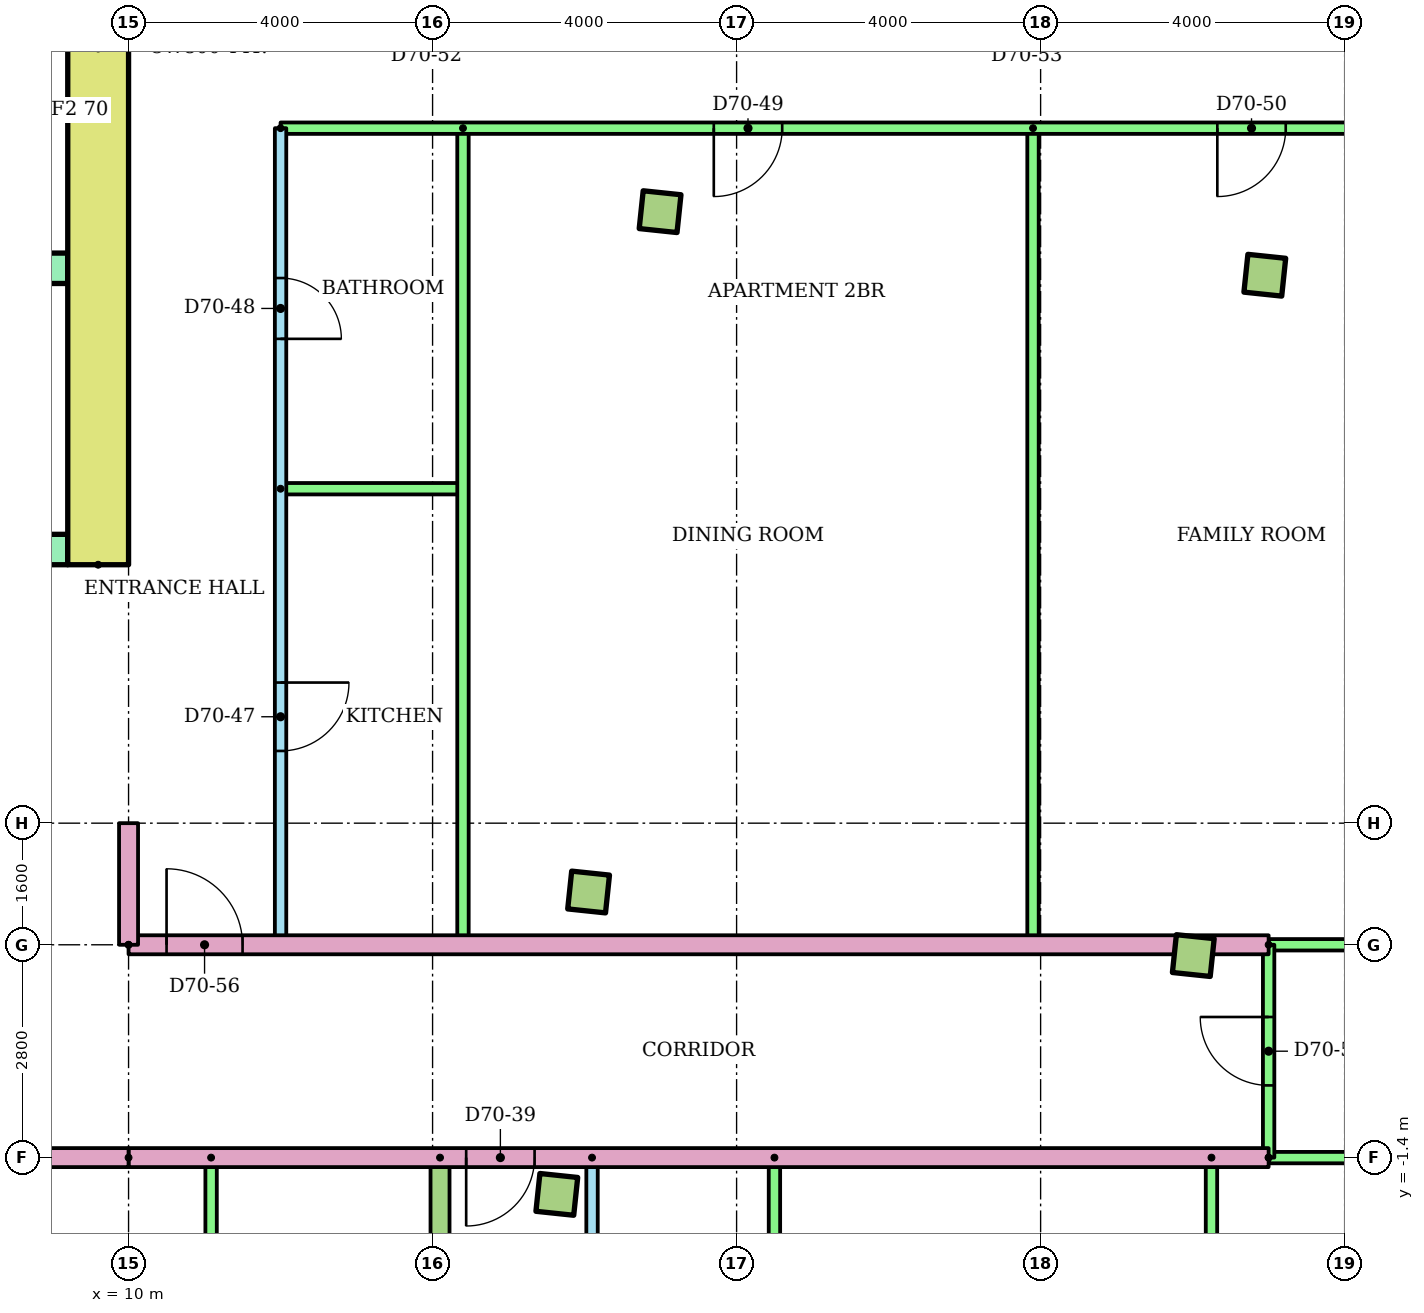
"""IFC4 building model, lengths in metres.
Left out: names, types, materials, properties, quantities, classifications, styles, units other than length and angle.
Written with IfcOpenShell. Run it as: python <this file> out.ifc"""

import sys

from ifc_helpers import new_model, si_unit, direction, frame, frame_2d, origin, origin_2d, place, context, subcontext, project, spatial, rectangle, extrude, element, fill, save


model = new_model("IFC4")
c1 = context("Model", 3, precision=1e-05, world=origin(), true_north=direction((0.0, 1.0)))
c2 = subcontext(c1, "Body", "Model", "MODEL_VIEW")
j1 = project(units=[si_unit("LENGTHUNIT", "METRE"), si_unit("PLANEANGLEUNIT", "RADIAN")], contexts=[c1])
p1 = place(None, origin())
s1 = spatial("IfcSite", under=j1, at=p1, CompositionType="ELEMENT")
p2 = place(p1, origin())
s2 = spatial("IfcBuilding", under=s1, at=p2, CompositionType="ELEMENT")
p3 = place(p2, frame((0.0, 0.0, 269.1)))
s3 = spatial("IfcBuildingStorey", under=s2, at=p3, CompositionType="ELEMENT", Elevation=269.1)
for number, where, z_axis, x_axis in (
    (1, (15.635, -1.884, 0.0), (0.0, 0.0, 1.0), (0.995, -0.105, 0.0)),
    (2, (16.053, 2.094, 0.0), (0.0, 0.0, 1.0), (0.995, -0.105, 0.0)),
    (3, (24.009, 1.258, 0.0), (0.0, 0.0, 1.0), (0.995, -0.105, 0.0)),
    (4, (16.993, 11.045, 0.0), (0.0, 0.0, 1.0), (0.995, -0.105, 0.0)),
    (5, (24.95, 10.209, 0.0), (0.0, 0.0, 1.0), (0.995, -0.105, 0.0)),
):
    element("IfcColumn", number, at=place(p3, frame(where, z_axis=z_axis, x_axis=x_axis)), inside=s3, PredefinedType="COLUMN", context=c2, shape_type="SweptSolid", body=[
        extrude(rectangle(XDim=0.5, YDim=0.5, at=origin_2d()), origin(), (0.0, 0.0, 1.0), 3.2),
    ])
p4 = place(p3, frame((9.6, 6.4, 0.0), z_axis=(0.0, 0.0, 1.0), x_axis=(0.0, 1.0, 0.0)))
e6 = element("IfcWall", 6, at=p4, inside=s3, PredefinedType="SHEAR", context=c2, shape_type="SweptSolid", body=[
    extrude(rectangle(XDim=13.6, YDim=0.8, at=frame_2d((6.8, 0.0))), origin(), (0.0, 0.0, 1.0), 2.92),
])
p5 = place(p3, frame((-9.2, 6.6, 0.0)))
e7 = element("IfcWall", 7, at=p5, inside=s3, PredefinedType="SHEAR", context=c2, shape_type="SweptSolid", body=[
    extrude(rectangle(XDim=18.4, YDim=0.4, at=frame_2d((9.2, 0.0))), origin(), (0.0, 0.0, 1.0), 2.92),
])
p6 = place(p5, frame((8.3, 0.0, 0.0)))
e8 = element("IfcOpeningElement", 8, at=p6, cuts=e7, PredefinedType="OPENING", context=c2, shape_type="SweptSolid", body=[
    extrude(rectangle(XDim=1.8, YDim=2.1, at=frame_2d((0.9, 1.05))), frame((0.0, 0.21, 0.0), z_axis=(0.0, -1.0, 0.0), x_axis=(1.0, 0.0, 0.0)), (0.0, 0.0, 1.0), 0.42),
])
p7 = place(p5, frame((3.8, 0.0, 0.0)))
e9 = element("IfcOpeningElement", 9, at=p7, cuts=e7, PredefinedType="OPENING", context=c2, shape_type="SweptSolid", body=[
    extrude(rectangle(XDim=1.8, YDim=2.1, at=frame_2d((0.9, 1.05))), frame((0.0, 0.21, 0.0), z_axis=(0.0, -1.0, 0.0), x_axis=(1.0, 0.0, 0.0)), (0.0, 0.0, 1.0), 0.42),
])
p8 = place(p5, frame((12.8, 0.0, 0.0)))
e10 = element("IfcOpeningElement", 10, at=p8, cuts=e7, PredefinedType="OPENING", context=c2, shape_type="SweptSolid", body=[
    extrude(rectangle(XDim=1.8, YDim=2.1, at=frame_2d((0.9, 1.05))), frame((0.0, 0.21, 0.0), z_axis=(0.0, -1.0, 0.0), x_axis=(1.0, 0.0, 0.0)), (0.0, 0.0, 1.0), 0.42),
])
p9 = place(p3, frame((1.2, 10.3, 0.0)))
e11 = element("IfcWall", 11, at=p9, inside=s3, PredefinedType="SHEAR", context=c2, shape_type="SweptSolid", body=[
    extrude(rectangle(XDim=8.0, YDim=0.4, at=frame_2d((4.0, 0.0))), origin(), (0.0, 0.0, 1.0), 2.92),
])
p10 = place(p9, frame((0.817, 0.0, 0.0)))
e12 = element("IfcOpeningElement", 12, at=p10, cuts=e11, PredefinedType="OPENING", context=c2, shape_type="SweptSolid", body=[
    extrude(rectangle(XDim=1.1, YDim=2.1, at=frame_2d((0.55, 1.05))), frame((0.0, 0.21, 0.0), z_axis=(0.0, -1.0, 0.0), x_axis=(1.0, 0.0, 0.0)), (0.0, 0.0, 1.0), 0.42),
])
p11 = place(p9, frame((3.55, 0.0, 0.0)))
e13 = element("IfcOpeningElement", 13, at=p11, cuts=e11, PredefinedType="OPENING", context=c2, shape_type="SweptSolid", body=[
    extrude(rectangle(XDim=1.1, YDim=2.1, at=frame_2d((0.55, 1.05))), frame((0.0, 0.21, 0.0), z_axis=(0.0, -1.0, 0.0), x_axis=(1.0, 0.0, 0.0)), (0.0, 0.0, 1.0), 0.42),
])
p12 = place(p9, frame((6.283, 0.0, 0.0)))
e14 = element("IfcOpeningElement", 14, at=p12, cuts=e11, PredefinedType="OPENING", context=c2, shape_type="SweptSolid", body=[
    extrude(rectangle(XDim=1.1, YDim=2.1, at=frame_2d((0.55, 1.05))), frame((0.0, 0.21, 0.0), z_axis=(0.0, -1.0, 0.0), x_axis=(1.0, 0.0, 0.0)), (0.0, 0.0, 1.0), 0.42),
])
p13 = place(p3, frame((11.086, -1.4, 0.0), z_axis=(0.0, 0.0, 1.0), x_axis=(0.0, -1.0, 0.0)))
e15 = element("IfcWall", 15, at=p13, inside=s3, PredefinedType="PARTITIONING", context=c2, shape_type="SweptSolid", body=[
    extrude(rectangle(XDim=7.484, YDim=0.15, at=frame_2d((3.742, 0.0))), origin(), (0.0, 0.0, 1.0), 2.4),
])
p14 = place(p3, frame((16.098, -1.4, 0.0), z_axis=(0.0, 0.0, 1.0), x_axis=(0.0, -1.0, 0.0)))
e16 = element("IfcWall", 16, at=p14, inside=s3, PredefinedType="PARTITIONING", context=c2, shape_type="SweptSolid", body=[
    extrude(rectangle(XDim=8.982, YDim=0.15, at=frame_2d((4.491, 0.0))), origin(), (0.0, 0.0, 1.0), 2.4),
])
p15 = place(p14, frame((2.05, 0.0, 0.0)))
e17 = element("IfcOpeningElement", 17, at=p15, cuts=e16, PredefinedType="OPENING", context=c2, shape_type="SweptSolid", body=[
    extrude(rectangle(XDim=0.9, YDim=2.1, at=frame_2d((0.45, 1.05))), frame((0.0, 0.085, 0.0), z_axis=(0.0, -1.0, 0.0), x_axis=(1.0, 0.0, 0.0)), (0.0, 0.0, 1.0), 0.17),
])
p16 = place(p14, frame((6.591, 0.0, 0.0)))
e18 = element("IfcOpeningElement", 18, at=p16, cuts=e16, PredefinedType="OPENING", context=c2, shape_type="SweptSolid", body=[
    extrude(rectangle(XDim=0.8, YDim=2.1, at=frame_2d((0.4, 1.05))), frame((0.0, 0.085, 0.0), z_axis=(0.0, -1.0, 0.0), x_axis=(1.0, 0.0, 0.0)), (0.0, 0.0, 1.0), 0.17),
])
for number, where, z_axis, x_axis in (
    (19, (18.498, -1.4, 0.0), (0.0, 0.0, 1.0), (0.0, -1.0, 0.0)),
    (20, (24.248, -1.4, 0.0), (0.0, 0.0, 1.0), (0.0, -1.0, 0.0)),
):
    element("IfcWall", number, at=place(p3, frame(where, z_axis=z_axis, x_axis=x_axis)), inside=s3, PredefinedType="PARTITIONING", context=c2, shape_type="SweptSolid", body=[
        extrude(rectangle(XDim=8.982, YDim=0.15, at=frame_2d((4.491, 0.0))), origin(), (0.0, 0.0, 1.0), 2.4),
    ])
p17 = place(p3, frame((14.098, -1.4, 0.0), z_axis=(0.0, 0.0, 1.0), x_axis=(0.0, -1.0, 0.0)))
e21 = element("IfcWall", 21, at=p17, inside=s3, PredefinedType="PARTITIONING", context=c2, shape_type="SweptSolid", body=[
    extrude(rectangle(XDim=15.013, YDim=0.25, at=frame_2d((7.506, 0.0))), origin(), (0.0, 0.0, 1.0), 2.4),
])
p18 = place(p3, frame((25.0, -1.4, 0.0), z_axis=(0.0, 0.0, 1.0), x_axis=(-1.0, 0.0, 0.0)))
e22 = element("IfcWall", 22, at=p18, inside=s3, PredefinedType="PARTITIONING", context=c2, shape_type="SweptSolid", body=[
    extrude(rectangle(XDim=15.0, YDim=0.25, at=frame_2d((7.5, 0.0))), origin(), (0.0, 0.0, 1.0), 2.4),
])
p19 = place(p18, frame((9.658, 0.0, 0.0)))
e23 = element("IfcOpeningElement", 23, at=p19, cuts=e22, PredefinedType="OPENING", context=c2, shape_type="SweptSolid", body=[
    extrude(rectangle(XDim=0.9, YDim=2.1, at=frame_2d((0.45, 1.05))), frame((0.0, 0.135, 0.0), z_axis=(0.0, -1.0, 0.0), x_axis=(1.0, 0.0, 0.0)), (0.0, 0.0, 1.0), 0.27),
])
p20 = place(p3, frame((30.798, -1.4, 0.0), z_axis=(0.0, 0.0, 1.0), x_axis=(-1.0, 0.0, 0.0)))
e24 = element("IfcWall", 24, at=p20, inside=s3, PredefinedType="PARTITIONING", context=c2, shape_type="SweptSolid", body=[
    extrude(rectangle(XDim=5.798, YDim=0.15, at=frame_2d((2.899, 0.0))), origin(), (0.0, 0.0, 1.0), 2.4),
])
p21 = place(p3, frame((12.0, 12.143, 0.0), z_axis=(0.0, 0.0, 1.0), x_axis=(0.0, -1.0, 0.0)))
e25 = element("IfcWall", 25, at=p21, inside=s3, PredefinedType="PARTITIONING", context=c2, shape_type="SweptSolid", body=[
    extrude(rectangle(XDim=10.743, YDim=0.15, at=frame_2d((5.372, 0.0))), origin(), (0.0, 0.0, 1.0), 2.4),
])
p22 = place(p21, frame((7.293, 0.0, 0.0)))
e26 = element("IfcOpeningElement", 26, at=p22, cuts=e25, PredefinedType="OPENING", context=c2, shape_type="SweptSolid", body=[
    extrude(rectangle(XDim=0.9, YDim=2.1, at=frame_2d((0.45, 1.05))), frame((0.0, 0.085, 0.0), z_axis=(0.0, -1.0, 0.0), x_axis=(1.0, 0.0, 0.0)), (0.0, 0.0, 1.0), 0.17),
])
p23 = place(p21, frame((1.972, 0.0, 0.0)))
e27 = element("IfcOpeningElement", 27, at=p23, cuts=e25, PredefinedType="OPENING", context=c2, shape_type="SweptSolid", body=[
    extrude(rectangle(XDim=0.8, YDim=2.1, at=frame_2d((0.4, 1.05))), frame((0.0, 0.085, 0.0), z_axis=(0.0, -1.0, 0.0), x_axis=(1.0, 0.0, 0.0)), (0.0, 0.0, 1.0), 0.17),
])
p24 = place(p3, frame((12.0, 7.4, 0.0)))
e28 = element("IfcWall", 28, at=p24, inside=s3, PredefinedType="PARTITIONING", context=c2, shape_type="SweptSolid", body=[
    extrude(rectangle(XDim=2.4, YDim=0.15, at=frame_2d((1.2, 0.0))), origin(), (0.0, 0.0, 1.0), 2.4),
])
for number, where, z_axis, x_axis in (
    (29, (14.4, 12.143, 0.0), (0.0, 0.0, 1.0), (0.0, -1.0, 0.0)),
    (30, (21.9, 12.143, 0.0), (0.0, 0.0, 1.0), (0.0, -1.0, 0.0)),
):
    element("IfcWall", number, at=place(p3, frame(where, z_axis=z_axis, x_axis=x_axis)), inside=s3, PredefinedType="PARTITIONING", context=c2, shape_type="SweptSolid", body=[
        extrude(rectangle(XDim=10.743, YDim=0.15, at=frame_2d((5.372, 0.0))), origin(), (0.0, 0.0, 1.0), 2.4),
    ])
p25 = place(p3, frame((32.213, 12.143, 0.0), z_axis=(0.0, 0.0, 1.0), x_axis=(-1.0, 0.0, 0.0)))
e31 = element("IfcWall", 31, at=p25, inside=s3, PredefinedType="PARTITIONING", context=c2, shape_type="SweptSolid", body=[
    extrude(rectangle(XDim=20.213, YDim=0.15, at=frame_2d((10.106, 0.0))), origin(), (0.0, 0.0, 1.0), 2.4),
])
p26 = place(p25, frame((13.613, 0.0, 0.0)))
e32 = element("IfcOpeningElement", 32, at=p26, cuts=e31, PredefinedType="OPENING", context=c2, shape_type="SweptSolid", body=[
    extrude(rectangle(XDim=0.9, YDim=2.1, at=frame_2d((0.45, 1.05))), frame((0.0, 0.085, 0.0), z_axis=(0.0, -1.0, 0.0), x_axis=(1.0, 0.0, 0.0)), (0.0, 0.0, 1.0), 0.17),
])
p27 = place(p25, frame((6.988, 0.0, 0.0)))
e33 = element("IfcOpeningElement", 33, at=p27, cuts=e31, PredefinedType="OPENING", context=c2, shape_type="SweptSolid", body=[
    extrude(rectangle(XDim=0.9, YDim=2.1, at=frame_2d((0.45, 1.05))), frame((0.0, 0.085, 0.0), z_axis=(0.0, -1.0, 0.0), x_axis=(1.0, 0.0, 0.0)), (0.0, 0.0, 1.0), 0.17),
])
p28 = place(p25, frame((1.909, 0.0, 0.0)))
e34 = element("IfcOpeningElement", 34, at=p28, cuts=e31, PredefinedType="OPENING", context=c2, shape_type="SweptSolid", body=[
    extrude(rectangle(XDim=0.9, YDim=2.1, at=frame_2d((0.45, 1.05))), frame((0.0, 0.085, 0.0), z_axis=(0.0, -1.0, 0.0), x_axis=(1.0, 0.0, 0.0)), (0.0, 0.0, 1.0), 0.17),
])
p29 = place(p3, frame((10.0, 1.4, 0.0)))
e35 = element("IfcWall", 35, at=p29, inside=s3, PredefinedType="PARTITIONING", context=c2, shape_type="SweptSolid", body=[
    extrude(rectangle(XDim=15.0, YDim=0.25, at=frame_2d((7.5, 0.0))), origin(), (0.0, 0.0, 1.0), 2.4),
])
p30 = place(p29, frame((0.5, 0.0, 0.0)))
e36 = element("IfcOpeningElement", 36, at=p30, cuts=e35, PredefinedType="OPENING", context=c2, shape_type="SweptSolid", body=[
    extrude(rectangle(XDim=1.0, YDim=2.1, at=frame_2d((0.5, 1.05))), frame((0.0, 0.135, 0.0), z_axis=(0.0, -1.0, 0.0), x_axis=(1.0, 0.0, 0.0)), (0.0, 0.0, 1.0), 0.27),
])
p31 = place(p3, frame((25.0, 1.4, 0.0)))
e37 = element("IfcWall", 37, at=p31, inside=s3, PredefinedType="PARTITIONING", context=c2, shape_type="SweptSolid", body=[
    extrude(rectangle(XDim=6.093, YDim=0.15, at=frame_2d((3.046, 0.0))), origin(), (0.0, 0.0, 1.0), 2.4),
])
p32 = place(p3, frame((25.0, -1.4, 0.0), z_axis=(0.0, 0.0, 1.0), x_axis=(0.0, 1.0, 0.0)))
e38 = element("IfcWall", 38, at=p32, inside=s3, PredefinedType="PARTITIONING", context=c2, shape_type="SweptSolid", body=[
    extrude(rectangle(XDim=2.8, YDim=0.15, at=frame_2d((1.4, 0.0))), origin(), (0.0, 0.0, 1.0), 2.4),
])
p33 = place(p32, frame((0.95, 0.0, 0.0)))
e39 = element("IfcOpeningElement", 39, at=p33, cuts=e38, PredefinedType="OPENING", context=c2, shape_type="SweptSolid", body=[
    extrude(rectangle(XDim=0.9, YDim=2.1, at=frame_2d((0.45, 1.05))), frame((0.0, 0.085, 0.0), z_axis=(0.0, -1.0, 0.0), x_axis=(1.0, 0.0, 0.0)), (0.0, 0.0, 1.0), 0.17),
])
p34 = place(p3, frame((10.0, -1.4, 0.0), z_axis=(0.0, 0.0, 1.0), x_axis=(-1.0, 0.0, 0.0)))
e40 = element("IfcWall", 40, at=p34, inside=s3, PredefinedType="PARTITIONING", context=c2, shape_type="SweptSolid", body=[
    extrude(rectangle(XDim=20.0, YDim=0.25, at=frame_2d((10.0, 0.0))), origin(), (0.0, 0.0, 1.0), 2.4),
])
p35 = place(p34, frame((12.314, 0.0, 0.0)))
e41 = element("IfcOpeningElement", 41, at=p35, cuts=e40, PredefinedType="OPENING", context=c2, shape_type="SweptSolid", body=[
    extrude(rectangle(XDim=1.0, YDim=2.1, at=frame_2d((0.5, 1.05))), frame((0.0, 0.135, 0.0), z_axis=(0.0, -1.0, 0.0), x_axis=(1.0, 0.0, 0.0)), (0.0, 0.0, 1.0), 0.27),
])
p36 = place(p34, frame((10.57, 0.0, 0.0)))
e42 = element("IfcOpeningElement", 42, at=p36, cuts=e40, PredefinedType="OPENING", context=c2, shape_type="SweptSolid", body=[
    extrude(rectangle(XDim=0.9, YDim=2.1, at=frame_2d((0.45, 1.05))), frame((0.0, 0.135, 0.0), z_axis=(0.0, -1.0, 0.0), x_axis=(1.0, 0.0, 0.0)), (0.0, 0.0, 1.0), 0.27),
])
p37 = place(p3, frame((10.0, 1.4, 0.0), z_axis=(0.0, 0.0, 1.0), x_axis=(0.0, 1.0, 0.0)))
e43 = element("IfcWall", 43, at=p37, inside=s3, PredefinedType="PARTITIONING", context=c2, shape_type="SweptSolid", body=[
    extrude(rectangle(XDim=1.6, YDim=0.25, at=frame_2d((0.8, 0.0))), origin(), (0.0, 0.0, 1.0), 2.4),
])
p38 = place(p19, origin())
e44 = element("IfcDoor", 44, at=p38, inside=s3, OperationType="SINGLE_SWING_RIGHT", PredefinedType="DOOR", context=c2, shape_type="SweptSolid", body=[
    extrude(rectangle(XDim=0.9, YDim=2.1, at=frame_2d((0.45, 1.05))), frame((0.0, 0.025, 0.0), z_axis=(0.0, -1.0, 0.0), x_axis=(1.0, 0.0, 0.0)), (0.0, 0.0, 1.0), 0.05),
])
fill(e23, e44)
p39 = place(p22, origin())
e45 = element("IfcDoor", 45, at=p39, inside=s3, OperationType="SINGLE_SWING_LEFT", PredefinedType="DOOR", context=c2, shape_type="SweptSolid", body=[
    extrude(rectangle(XDim=0.9, YDim=2.1, at=frame_2d((0.45, 1.05))), frame((0.0, 0.025, 0.0), z_axis=(0.0, -1.0, 0.0), x_axis=(1.0, 0.0, 0.0)), (0.0, 0.0, 1.0), 0.05),
])
fill(e26, e45)
p40 = place(p23, origin())
e46 = element("IfcDoor", 46, at=p40, inside=s3, OperationType="SINGLE_SWING_RIGHT", PredefinedType="DOOR", context=c2, shape_type="SweptSolid", body=[
    extrude(rectangle(XDim=0.8, YDim=2.1, at=frame_2d((0.4, 1.05))), frame((0.0, 0.025, 0.0), z_axis=(0.0, -1.0, 0.0), x_axis=(1.0, 0.0, 0.0)), (0.0, 0.0, 1.0), 0.05),
])
fill(e27, e46)
p41 = place(p26, origin())
e47 = element("IfcDoor", 47, at=p41, inside=s3, OperationType="SINGLE_SWING_RIGHT", PredefinedType="DOOR", context=c2, shape_type="SweptSolid", body=[
    extrude(rectangle(XDim=0.9, YDim=2.1, at=frame_2d((0.45, 1.05))), frame((0.0, 0.025, 0.0), z_axis=(0.0, -1.0, 0.0), x_axis=(1.0, 0.0, 0.0)), (0.0, 0.0, 1.0), 0.05),
])
fill(e32, e47)
p42 = place(p27, origin())
e48 = element("IfcDoor", 48, at=p42, inside=s3, OperationType="SINGLE_SWING_RIGHT", PredefinedType="DOOR", context=c2, shape_type="SweptSolid", body=[
    extrude(rectangle(XDim=0.9, YDim=2.1, at=frame_2d((0.45, 1.05))), frame((0.0, 0.025, 0.0), z_axis=(0.0, -1.0, 0.0), x_axis=(1.0, 0.0, 0.0)), (0.0, 0.0, 1.0), 0.05),
])
fill(e33, e48)
p43 = place(p30, origin())
e49 = element("IfcDoor", 49, at=p43, inside=s3, OperationType="SINGLE_SWING_LEFT", PredefinedType="DOOR", context=c2, shape_type="SweptSolid", body=[
    extrude(rectangle(XDim=1.0, YDim=2.1, at=frame_2d((0.5, 1.05))), frame((0.0, 0.025, 0.0), z_axis=(0.0, -1.0, 0.0), x_axis=(1.0, 0.0, 0.0)), (0.0, 0.0, 1.0), 0.05),
])
fill(e36, e49)
p44 = place(p33, origin())
e50 = element("IfcDoor", 50, at=p44, inside=s3, OperationType="SINGLE_SWING_RIGHT", PredefinedType="DOOR", context=c2, shape_type="SweptSolid", body=[
    extrude(rectangle(XDim=0.9, YDim=2.1, at=frame_2d((0.45, 1.05))), frame((0.0, 0.025, 0.0), z_axis=(0.0, -1.0, 0.0), x_axis=(1.0, 0.0, 0.0)), (0.0, 0.0, 1.0), 0.05),
])
fill(e39, e50)
save(model, sys.argv[1])
